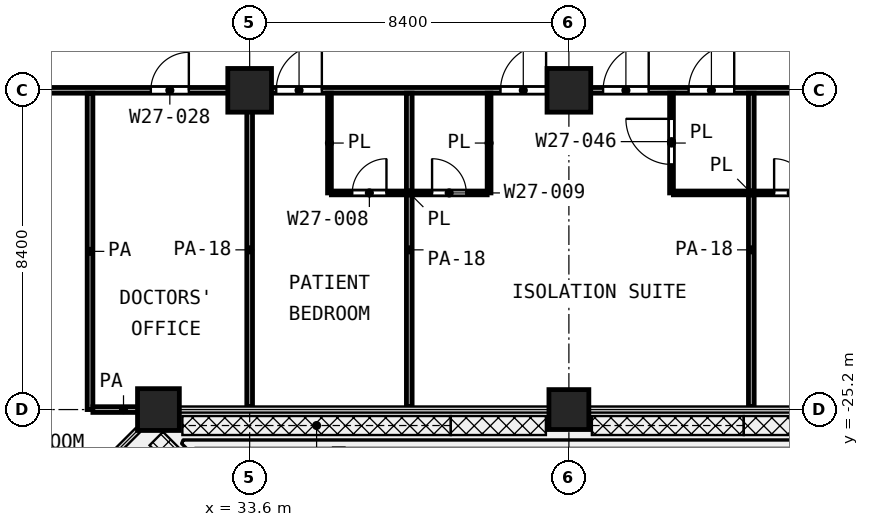
"""IFC4 building model, lengths in metres.
Left out: names, types, materials, properties, quantities, classifications, styles, units other than length and angle.
Written with IfcOpenShell. Run it as: python <this file> out.ifc"""

import sys

from ifc_helpers import new_model, si_unit, direction, frame, frame_2d, origin, origin_2d, place, context, subcontext, project, spatial, rectangle, extrude, element, fill, save


model = new_model("IFC4")
c1 = context("Model", 3, precision=1e-05, world=origin(), true_north=direction((0.0, 1.0)))
c2 = subcontext(c1, "Body", "Model", "MODEL_VIEW")
j1 = project(units=[si_unit("LENGTHUNIT", "METRE"), si_unit("PLANEANGLEUNIT", "RADIAN")], contexts=[c1])
p1 = place(None, origin())
s1 = spatial("IfcSite", under=j1, at=p1, CompositionType="ELEMENT")
p2 = place(p1, origin())
s2 = spatial("IfcBuilding", under=s1, at=p2, CompositionType="ELEMENT")
p3 = place(p2, frame((0.0, 0.0, 119.8)))
s3 = spatial("IfcBuildingStorey", under=s2, at=p3, CompositionType="ELEMENT", Elevation=119.8)
for number, where, z_axis, x_axis in (
    (1, (33.6, -16.8, 0.0), (0.0, 0.0, 1.0), (1.0, 0.0, 0.0)),
    (2, (42.0, -16.8, 0.0), (0.0, 0.0, 1.0), (1.0, 0.0, 0.0)),
):
    element("IfcColumn", number, at=place(p3, frame(where, z_axis=z_axis, x_axis=x_axis)), inside=s3, PredefinedType="COLUMN", context=c2, shape_type="SweptSolid", body=[
        extrude(rectangle(XDim=1.15, YDim=1.15, at=origin_2d()), origin(), (0.0, 0.0, 1.0), 4.2),
    ])
p4 = place(p3, frame((31.2, -25.2, 0.0), z_axis=(0.0, 0.0, 1.0), x_axis=(1.0, 0.0, 0.0)))
e3 = element("IfcColumn", 3, at=p4, inside=s3, PredefinedType="COLUMN", context=c2, shape_type="SweptSolid", body=[
    extrude(rectangle(XDim=1.1, YDim=1.1, at=origin_2d()), origin(), (0.0, 0.0, 1.0), 4.2),
])
p5 = place(p3, frame((42.0, -25.2, 0.0), z_axis=(0.0, 0.0, 1.0), x_axis=(1.0, 0.0, 0.0)))
e4 = element("IfcColumn", 4, at=p5, inside=s3, PredefinedType="COLUMN", context=c2, shape_type="SweptSolid", body=[
    extrude(rectangle(XDim=1.05, YDim=1.05, at=origin_2d()), origin(), (0.0, 0.0, 1.0), 4.2),
])
p6 = place(p3, frame((35.75, -19.5, 0.0), z_axis=(0.0, 0.0, 1.0), x_axis=(1.0, 0.0, 0.0)))
e5 = element("IfcWall", 5, at=p6, inside=s3, PredefinedType="PARTITIONING", context=c2, shape_type="SweptSolid", body=[
    extrude(rectangle(XDim=4.1, YDim=0.1, at=frame_2d((2.05, 0.0))), origin(), (0.0, 0.0, 1.0), 3.6),
])
p7 = place(p6, frame((0.55, 0.0, 0.0)))
e6 = element("IfcOpeningElement", 6, at=p7, cuts=e5, PredefinedType="OPENING", context=c2, shape_type="SweptSolid", body=[
    extrude(rectangle(XDim=0.9, YDim=2.1, at=frame_2d((0.45, 1.05))), frame((0.0, 0.06, 0.0), z_axis=(0.0, -1.0, 0.0), x_axis=(1.0, 0.0, 0.0)), (0.0, 0.0, 1.0), 0.12),
])
p8 = place(p6, frame((2.65, 0.0, 0.0)))
e7 = element("IfcOpeningElement", 7, at=p8, cuts=e5, PredefinedType="OPENING", context=c2, shape_type="SweptSolid", body=[
    extrude(rectangle(XDim=0.9, YDim=2.1, at=frame_2d((0.45, 1.05))), frame((0.0, 0.06, 0.0), z_axis=(0.0, -1.0, 0.0), x_axis=(1.0, 0.0, 0.0)), (0.0, 0.0, 1.0), 0.12),
])
p9 = place(p3, frame((44.75, -19.5, 0.0), z_axis=(0.0, 0.0, 1.0), x_axis=(1.0, 0.0, 0.0)))
e8 = element("IfcWall", 8, at=p9, inside=s3, PredefinedType="PARTITIONING", context=c2, shape_type="SweptSolid", body=[
    extrude(rectangle(XDim=4.1, YDim=0.1, at=frame_2d((2.05, 0.0))), origin(), (0.0, 0.0, 1.0), 3.6),
])
p10 = place(p9, frame((2.65, 0.0, 0.0)))
e9 = element("IfcOpeningElement", 9, at=p10, cuts=e8, PredefinedType="OPENING", context=c2, shape_type="SweptSolid", body=[
    extrude(rectangle(XDim=0.9, YDim=2.1, at=frame_2d((0.45, 1.05))), frame((0.0, 0.06, 0.0), z_axis=(0.0, -1.0, 0.0), x_axis=(1.0, 0.0, 0.0)), (0.0, 0.0, 1.0), 0.12),
])
for number, where, z_axis, x_axis in (
    (10, (35.7, -19.5, 0.0), (0.0, 0.0, 1.0), (0.0, 1.0, 0.0)),
    (11, (39.9, -19.5, 0.0), (0.0, 0.0, 1.0), (0.0, 1.0, 0.0)),
):
    element("IfcWall", number, at=place(p3, frame(where, z_axis=z_axis, x_axis=x_axis)), inside=s3, PredefinedType="PARTITIONING", context=c2, shape_type="SweptSolid", body=[
        extrude(rectangle(XDim=2.625, YDim=0.1, at=frame_2d((1.312, 0.0))), origin(), (0.0, 0.0, 1.0), 3.6),
    ])
p11 = place(p3, frame((44.7, -19.5, 0.0), z_axis=(0.0, 0.0, 1.0), x_axis=(0.0, 1.0, 0.0)))
e12 = element("IfcWall", 12, at=p11, inside=s3, PredefinedType="PARTITIONING", context=c2, shape_type="SweptSolid", body=[
    extrude(rectangle(XDim=2.625, YDim=0.1, at=frame_2d((1.312, 0.0))), origin(), (0.0, 0.0, 1.0), 3.6),
])
p12 = place(p11, frame((0.75, 0.0, 0.0)))
e13 = element("IfcOpeningElement", 13, at=p12, cuts=e12, PredefinedType="OPENING", context=c2, shape_type="SweptSolid", body=[
    extrude(rectangle(XDim=1.2, YDim=2.1, at=frame_2d((0.6, 1.05))), frame((0.0, 0.06, 0.0), z_axis=(0.0, -1.0, 0.0), x_axis=(1.0, 0.0, 0.0)), (0.0, 0.0, 1.0), 0.12),
])
p13 = place(p3, frame((29.475, -25.2, 0.0), z_axis=(0.0, 0.0, 1.0), x_axis=(1.0, 0.0, 0.0)))
e14 = element("IfcWall", 14, at=p13, inside=s3, PredefinedType="PARTITIONING", context=c2, shape_type="SweptSolid", body=[
    extrude(rectangle(XDim=1.612, YDim=0.15, at=frame_2d((0.806, 0.0))), origin(), (0.0, 0.0, 1.0), 3.6),
])
p14 = place(p3, frame((25.0, -16.8, 0.0), z_axis=(0.0, 0.0, 1.0), x_axis=(1.0, 0.0, 0.0)))
e15 = element("IfcWall", 15, at=p14, inside=s3, PredefinedType="PARTITIONING", context=c2, shape_type="SweptSolid", body=[
    extrude(rectangle(XDim=50.52, YDim=0.15, at=frame_2d((25.26, 0.0))), origin(), (0.0, 0.0, 1.0), 3.6),
])
p15 = place(p14, frame((1.55, 0.0, 0.0)))
e16 = element("IfcOpeningElement", 16, at=p15, cuts=e15, PredefinedType="OPENING", context=c2, shape_type="SweptSolid", body=[
    extrude(rectangle(XDim=1.5, YDim=2.1, at=frame_2d((0.75, 1.05))), frame((0.0, 0.085, 0.0), z_axis=(0.0, -1.0, 0.0), x_axis=(1.0, 0.0, 0.0)), (0.0, 0.0, 1.0), 0.17),
])
p16 = place(p14, frame((6.0, 0.0, 0.0)))
e17 = element("IfcOpeningElement", 17, at=p16, cuts=e15, PredefinedType="OPENING", context=c2, shape_type="SweptSolid", body=[
    extrude(rectangle(XDim=1.0, YDim=2.1, at=frame_2d((0.5, 1.05))), frame((0.0, 0.085, 0.0), z_axis=(0.0, -1.0, 0.0), x_axis=(1.0, 0.0, 0.0)), (0.0, 0.0, 1.0), 0.17),
])
p17 = place(p14, frame((9.3, 0.0, 0.0)))
e18 = element("IfcOpeningElement", 18, at=p17, cuts=e15, PredefinedType="OPENING", context=c2, shape_type="SweptSolid", body=[
    extrude(rectangle(XDim=1.2, YDim=2.1, at=frame_2d((0.6, 1.05))), frame((0.0, 0.085, 0.0), z_axis=(0.0, -1.0, 0.0), x_axis=(1.0, 0.0, 0.0)), (0.0, 0.0, 1.0), 0.17),
])
p18 = place(p14, frame((17.9, 0.0, 0.0)))
e19 = element("IfcOpeningElement", 19, at=p18, cuts=e15, PredefinedType="OPENING", context=c2, shape_type="SweptSolid", body=[
    extrude(rectangle(XDim=1.2, YDim=2.1, at=frame_2d((0.6, 1.05))), frame((0.0, 0.085, 0.0), z_axis=(0.0, -1.0, 0.0), x_axis=(1.0, 0.0, 0.0)), (0.0, 0.0, 1.0), 0.17),
])
p19 = place(p14, frame((15.2, 0.0, 0.0)))
e20 = element("IfcOpeningElement", 20, at=p19, cuts=e15, PredefinedType="OPENING", context=c2, shape_type="SweptSolid", body=[
    extrude(rectangle(XDim=1.2, YDim=2.1, at=frame_2d((0.6, 1.05))), frame((0.0, 0.085, 0.0), z_axis=(0.0, -1.0, 0.0), x_axis=(1.0, 0.0, 0.0)), (0.0, 0.0, 1.0), 0.17),
])
p20 = place(p14, frame((20.15, 0.0, 0.0)))
e21 = element("IfcOpeningElement", 21, at=p20, cuts=e15, PredefinedType="OPENING", context=c2, shape_type="SweptSolid", body=[
    extrude(rectangle(XDim=1.2, YDim=2.1, at=frame_2d((0.6, 1.05))), frame((0.0, 0.085, 0.0), z_axis=(0.0, -1.0, 0.0), x_axis=(1.0, 0.0, 0.0)), (0.0, 0.0, 1.0), 0.17),
])
p21 = place(p14, frame((26.025, 0.0, 0.0)))
e22 = element("IfcOpeningElement", 22, at=p21, cuts=e15, PredefinedType="OPENING", context=c2, shape_type="SweptSolid", body=[
    extrude(rectangle(XDim=0.9, YDim=2.1, at=frame_2d((0.45, 1.05))), frame((0.0, 0.085, 0.0), z_axis=(0.0, -1.0, 0.0), x_axis=(1.0, 0.0, 0.0)), (0.0, 0.0, 1.0), 0.17),
])
p22 = place(p14, frame((27.65, 0.0, 0.0)))
e23 = element("IfcOpeningElement", 23, at=p22, cuts=e15, PredefinedType="OPENING", context=c2, shape_type="SweptSolid", body=[
    extrude(rectangle(XDim=1.2, YDim=2.1, at=frame_2d((0.6, 1.05))), frame((0.0, 0.085, 0.0), z_axis=(0.0, -1.0, 0.0), x_axis=(1.0, 0.0, 0.0)), (0.0, 0.0, 1.0), 0.17),
])
p23 = place(p14, frame((32.0, 0.0, 0.0)))
e24 = element("IfcOpeningElement", 24, at=p23, cuts=e15, PredefinedType="OPENING", context=c2, shape_type="SweptSolid", body=[
    extrude(rectangle(XDim=1.2, YDim=2.1, at=frame_2d((0.6, 1.05))), frame((0.0, 0.085, 0.0), z_axis=(0.0, -1.0, 0.0), x_axis=(1.0, 0.0, 0.0)), (0.0, 0.0, 1.0), 0.17),
])
p24 = place(p14, frame((34.8, 0.0, 0.0)))
e25 = element("IfcOpeningElement", 25, at=p24, cuts=e15, PredefinedType="OPENING", context=c2, shape_type="SweptSolid", body=[
    extrude(rectangle(XDim=1.2, YDim=2.1, at=frame_2d((0.6, 1.05))), frame((0.0, 0.085, 0.0), z_axis=(0.0, -1.0, 0.0), x_axis=(1.0, 0.0, 0.0)), (0.0, 0.0, 1.0), 0.17),
])
p25 = place(p14, frame((40.625, 0.0, 0.0)))
e26 = element("IfcOpeningElement", 26, at=p25, cuts=e15, PredefinedType="OPENING", context=c2, shape_type="SweptSolid", body=[
    extrude(rectangle(XDim=0.9, YDim=2.1, at=frame_2d((0.45, 1.05))), frame((0.0, 0.085, 0.0), z_axis=(0.0, -1.0, 0.0), x_axis=(1.0, 0.0, 0.0)), (0.0, 0.0, 1.0), 0.17),
])
p26 = place(p14, frame((44.15, 0.0, 0.0)))
e27 = element("IfcOpeningElement", 27, at=p26, cuts=e15, PredefinedType="OPENING", context=c2, shape_type="SweptSolid", body=[
    extrude(rectangle(XDim=1.2, YDim=2.1, at=frame_2d((0.6, 1.05))), frame((0.0, 0.085, 0.0), z_axis=(0.0, -1.0, 0.0), x_axis=(1.0, 0.0, 0.0)), (0.0, 0.0, 1.0), 0.17),
])
p27 = place(p14, frame((47.7, 0.0, 0.0)))
e28 = element("IfcOpeningElement", 28, at=p27, cuts=e15, PredefinedType="OPENING", context=c2, shape_type="SweptSolid", body=[
    extrude(rectangle(XDim=1.0, YDim=2.1, at=frame_2d((0.5, 1.05))), frame((0.0, 0.085, 0.0), z_axis=(0.0, -1.0, 0.0), x_axis=(1.0, 0.0, 0.0)), (0.0, 0.0, 1.0), 0.17),
])
p28 = place(p3, frame((29.4, -25.2, 0.0), z_axis=(0.0, 0.0, 1.0), x_axis=(0.0, 1.0, 0.0)))
e29 = element("IfcWall", 29, at=p28, inside=s3, PredefinedType="PARTITIONING", context=c2, shape_type="SweptSolid", body=[
    extrude(rectangle(XDim=8.325, YDim=0.15, at=frame_2d((4.163, 0.0))), origin(), (0.0, 0.0, 1.0), 3.6),
])
for number, where, z_axis, x_axis in (
    (30, (33.6, -25.12, 0.0), (0.0, 0.0, 1.0), (0.0, 1.0, 0.0)),
    (31, (37.8, -25.12, 0.0), (0.0, 0.0, 1.0), (0.0, 1.0, 0.0)),
    (32, (46.8, -25.12, 0.0), (0.0, 0.0, 1.0), (0.0, 1.0, 0.0)),
):
    element("IfcWall", number, at=place(p3, frame(where, z_axis=z_axis, x_axis=x_axis)), inside=s3, PredefinedType="PARTITIONING", context=c2, shape_type="SweptSolid", body=[
        extrude(rectangle(XDim=8.245, YDim=0.15, at=frame_2d((4.123, 0.0))), origin(), (0.0, 0.0, 1.0), 2.7),
    ])
p29 = place(p16, origin())
e33 = element("IfcDoor", 33, at=p29, inside=s3, OperationType="SINGLE_SWING_RIGHT", PredefinedType="DOOR", context=c2, shape_type="SweptSolid", body=[
    extrude(rectangle(XDim=1.0, YDim=2.1, at=frame_2d((0.5, 1.05))), frame((0.0, 0.025, 0.0), z_axis=(0.0, -1.0, 0.0), x_axis=(1.0, 0.0, 0.0)), (0.0, 0.0, 1.0), 0.05),
])
fill(e17, e33)
p30 = place(p17, origin())
e34 = element("IfcDoor", 34, at=p30, inside=s3, OperationType="SINGLE_SWING_RIGHT", PredefinedType="DOOR", context=c2, shape_type="SweptSolid", body=[
    extrude(rectangle(XDim=1.2, YDim=2.1, at=frame_2d((0.6, 1.05))), frame((0.0, 0.025, 0.0), z_axis=(0.0, -1.0, 0.0), x_axis=(1.0, 0.0, 0.0)), (0.0, 0.0, 1.0), 0.05),
])
fill(e18, e34)
p31 = place(p7, origin())
e35 = element("IfcDoor", 35, at=p31, inside=s3, OperationType="SINGLE_SWING_RIGHT", PredefinedType="DOOR", context=c2, shape_type="SweptSolid", body=[
    extrude(rectangle(XDim=0.9, YDim=2.1, at=frame_2d((0.45, 1.05))), frame((0.0, 0.025, 0.0), z_axis=(0.0, -1.0, 0.0), x_axis=(1.0, 0.0, 0.0)), (0.0, 0.0, 1.0), 0.05),
])
fill(e6, e35)
p32 = place(p18, origin())
e36 = element("IfcDoor", 36, at=p32, inside=s3, OperationType="SINGLE_SWING_RIGHT", PredefinedType="DOOR", context=c2, shape_type="SweptSolid", body=[
    extrude(rectangle(XDim=1.2, YDim=2.1, at=frame_2d((0.6, 1.05))), frame((0.0, 0.025, 0.0), z_axis=(0.0, -1.0, 0.0), x_axis=(1.0, 0.0, 0.0)), (0.0, 0.0, 1.0), 0.05),
])
fill(e19, e36)
p33 = place(p19, origin())
e37 = element("IfcDoor", 37, at=p33, inside=s3, OperationType="SINGLE_SWING_RIGHT", PredefinedType="DOOR", context=c2, shape_type="SweptSolid", body=[
    extrude(rectangle(XDim=1.2, YDim=2.1, at=frame_2d((0.6, 1.05))), frame((0.0, 0.025, 0.0), z_axis=(0.0, -1.0, 0.0), x_axis=(1.0, 0.0, 0.0)), (0.0, 0.0, 1.0), 0.05),
])
fill(e20, e37)
p34 = place(p20, origin())
e38 = element("IfcDoor", 38, at=p34, inside=s3, OperationType="SINGLE_SWING_RIGHT", PredefinedType="DOOR", context=c2, shape_type="SweptSolid", body=[
    extrude(rectangle(XDim=1.2, YDim=2.1, at=frame_2d((0.6, 1.05))), frame((0.0, 0.025, 0.0), z_axis=(0.0, -1.0, 0.0), x_axis=(1.0, 0.0, 0.0)), (0.0, 0.0, 1.0), 0.05),
])
fill(e21, e38)
p35 = place(p12, origin())
e39 = element("IfcDoor", 39, at=p35, inside=s3, OperationType="SINGLE_SWING_RIGHT", PredefinedType="DOOR", context=c2, shape_type="SweptSolid", body=[
    extrude(rectangle(XDim=1.2, YDim=2.1, at=frame_2d((0.6, 1.05))), frame((0.0, 0.025, 0.0), z_axis=(0.0, -1.0, 0.0), x_axis=(1.0, 0.0, 0.0)), (0.0, 0.0, 1.0), 0.05),
])
fill(e13, e39)
p36 = place(p8, origin())
e40 = element("IfcDoor", 40, at=p36, inside=s3, OperationType="SINGLE_SWING_LEFT", PredefinedType="DOOR", context=c2, shape_type="SweptSolid", body=[
    extrude(rectangle(XDim=0.9, YDim=2.1, at=frame_2d((0.45, 1.05))), frame((0.0, 0.025, 0.0), z_axis=(0.0, -1.0, 0.0), x_axis=(1.0, 0.0, 0.0)), (0.0, 0.0, 1.0), 0.05),
])
fill(e7, e40)
p37 = place(p10, origin())
e41 = element("IfcDoor", 41, at=p37, inside=s3, OperationType="SINGLE_SWING_LEFT", PredefinedType="DOOR", context=c2, shape_type="SweptSolid", body=[
    extrude(rectangle(XDim=0.9, YDim=2.1, at=frame_2d((0.45, 1.05))), frame((0.0, 0.025, 0.0), z_axis=(0.0, -1.0, 0.0), x_axis=(1.0, 0.0, 0.0)), (0.0, 0.0, 1.0), 0.05),
])
fill(e9, e41)
save(model, sys.argv[1])
